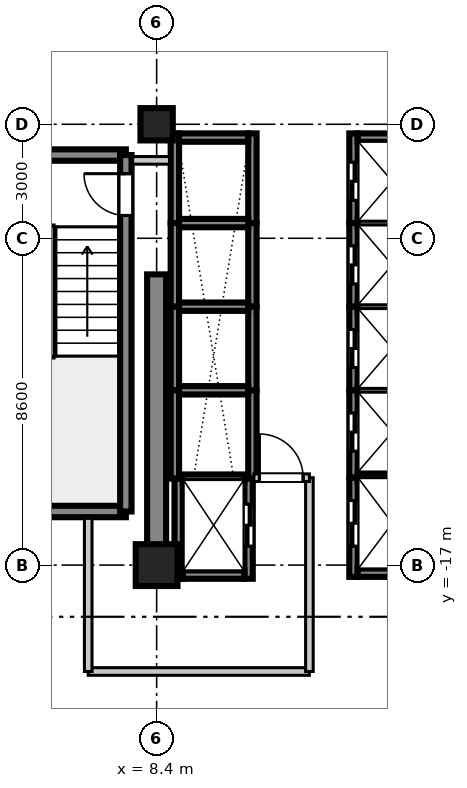
"""IFC4 building model, lengths in metres.
Left out: names, types, materials, properties, quantities, classifications, styles, units other than length and angle.
Written with IfcOpenShell. Run it as: python <this file> out.ifc"""

import sys

from ifc_helpers import new_model, si_unit, direction, frame, frame_2d, origin, origin_2d, place, context, subcontext, project, spatial, rectangle, extrude, source, transform, mapped, element, fill, save


model = new_model("IFC4")
c1 = context("Model", 3, precision=1e-05, world=origin(), true_north=direction((0.0, 1.0)))
c2 = subcontext(c1, "Body", "Model", "MODEL_VIEW")
j1 = project(units=[si_unit("LENGTHUNIT", "METRE"), si_unit("PLANEANGLEUNIT", "RADIAN")], contexts=[c1])
p1 = place(None, origin())
s1 = spatial("IfcSite", under=j1, at=p1, CompositionType="ELEMENT")
p2 = place(p1, origin())
s2 = spatial("IfcBuilding", under=s1, at=p2, CompositionType="ELEMENT")
p3 = place(p2, frame((0.0, 0.0, 170.9)))
s3 = spatial("IfcBuildingStorey", under=s2, at=p3, CompositionType="ELEMENT", Elevation=170.9)
m1 = source(origin(), c2, "Body", "SweptSolid", [
    extrude(rectangle(XDim=1.1, YDim=1.1, at=origin_2d()), origin(), (0.0, 0.0, 1.0), 3.605),
])
p4 = place(p3, frame((8.4, -17.0, 0.0), z_axis=(0.0, 0.0, 1.0), x_axis=(1.0, 0.0, 0.0)))
e1 = element("IfcColumn", 1, at=p4, inside=s3, PredefinedType="COLUMN", context=c2, shape_type="MappedRepresentation", body=[
    mapped(m1, transform((0.0, 0.0, 0.0), scale=1.0)),
])
m2 = source(origin(), c2, "Body", "SweptSolid", [
    extrude(rectangle(XDim=0.85, YDim=0.85, at=origin_2d()), origin(), (0.0, 0.0, 1.0), 3.605),
])
p5 = place(p3, frame((8.4, -5.4, 0.0), z_axis=(0.0, 0.0, 1.0), x_axis=(1.0, 0.0, 0.0)))
e2 = element("IfcColumn", 2, at=p5, inside=s3, PredefinedType="PILASTER", context=c2, shape_type="MappedRepresentation", body=[
    mapped(m2, transform((0.0, 0.0, 0.0), scale=1.0)),
])
m3 = source(origin(), c2, "Body", "SweptSolid", [
    extrude(rectangle(XDim=7.65, YDim=0.5, at=frame_2d((3.825, 0.0))), origin(), (0.0, 0.0, 1.0), 3.39),
])
p6 = place(p3, frame((8.4, -17.0, 0.0), z_axis=(0.0, 0.0, 1.0), x_axis=(0.0, 1.0, 0.0)))
e3 = element("IfcWall", 3, at=p6, inside=s3, PredefinedType="SHEAR", context=c2, shape_type="MappedRepresentation", body=[
    mapped(m3, transform((0.0, 0.0, 0.0), scale=1.0)),
])
m4 = source(origin(), c2, "Body", "SweptSolid", [
    extrude(rectangle(XDim=3.98, YDim=0.3, at=frame_2d((1.99, 0.0))), origin(), (0.0, 0.0, 1.0), 3.39),
])
for number, where, z_axis, x_axis in (
    (4, (3.61, -15.59, 0.0), (0.0, 0.0, 1.0), (1.0, 0.0, 0.0)),
    (5, (3.61, -6.21, 0.0), (0.0, 0.0, 1.0), (1.0, 0.0, 0.0)),
):
    element("IfcWall", number, at=place(p3, frame(where, z_axis=z_axis, x_axis=x_axis)), inside=s3, PredefinedType="SHEAR", context=c2, shape_type="MappedRepresentation", body=[
        mapped(m4, transform((0.0, 0.0, 0.0), scale=1.0)),
    ])
m5 = source(origin(), c2, "Body", "SweptSolid", [
    extrude(rectangle(XDim=9.38, YDim=0.3, at=frame_2d((4.69, 0.0))), origin(), (0.0, 0.0, 1.0), 3.39),
])
p7 = place(p3, frame((7.59, -15.59, 0.0), z_axis=(0.0, 0.0, 1.0), x_axis=(0.0, 1.0, 0.0)))
e6 = element("IfcWall", 6, at=p7, inside=s3, PredefinedType="SHEAR", context=c2, shape_type="MappedRepresentation", body=[
    mapped(m5, transform((0.0, 0.0, 0.0), scale=1.0)),
])
p8 = place(p7, frame((7.79, 0.0, 0.0)))
e7 = element("IfcOpeningElement", 7, at=p8, cuts=e6, PredefinedType="OPENING", context=c2, shape_type="SweptSolid", body=[
    extrude(rectangle(XDim=1.1, YDim=2.15, at=frame_2d((0.55, 1.075))), frame((0.0, 0.16, 0.0), z_axis=(0.0, -1.0, 0.0), x_axis=(1.0, 0.0, 0.0)), (0.0, 0.0, 1.0), 0.32),
])
m6 = source(origin(), c2, "Body", "SweptSolid", [
    extrude(rectangle(XDim=2.36, YDim=0.22, at=frame_2d((1.18, 0.0))), origin(), (0.0, 0.0, 1.0), 3.39),
])
p9 = place(p3, frame((13.58, -8.0, 0.0), z_axis=(0.0, 0.0, 1.0), x_axis=(0.0, 1.0, 0.0)))
e8 = element("IfcWall", 8, at=p9, inside=s3, PredefinedType="SHEAR", context=c2, shape_type="MappedRepresentation", body=[
    mapped(m6, transform((0.0, 0.0, 0.0), scale=1.0)),
])
p10 = place(p9, frame((0.6, 0.0, 0.0)))
e9 = element("IfcOpeningElement", 9, at=p10, cuts=e8, PredefinedType="OPENING", context=c2, shape_type="SweptSolid", body=[
    extrude(rectangle(XDim=1.0, YDim=2.2, at=frame_2d((0.5, 1.1))), frame((0.0, 0.12, 0.0), z_axis=(0.0, -1.0, 0.0), x_axis=(1.0, 0.0, 0.0)), (0.0, 0.0, 1.0), 0.24),
])
m7 = source(origin(), c2, "Body", "SweptSolid", [
    extrude(rectangle(XDim=1.82, YDim=0.22, at=frame_2d((0.91, 0.0))), origin(), (0.0, 0.0, 1.0), 3.39),
])
p11 = place(p3, frame((13.69, -5.75, 0.0), z_axis=(0.0, 0.0, 1.0), x_axis=(1.0, 0.0, 0.0)))
e10 = element("IfcWall", 10, at=p11, inside=s3, PredefinedType="SHEAR", context=c2, shape_type="MappedRepresentation", body=[
    mapped(m7, transform((0.0, 0.0, 0.0), scale=1.0)),
])
m8 = source(origin(), c2, "Body", "SweptSolid", [
    extrude(rectangle(XDim=2.2, YDim=0.22, at=frame_2d((1.1, 0.0))), origin(), (0.0, 0.0, 1.0), 3.39),
])
p12 = place(p3, frame((13.58, -10.2, 0.0), z_axis=(0.0, 0.0, 1.0), x_axis=(0.0, 1.0, 0.0)))
e11 = element("IfcWall", 11, at=p12, inside=s3, PredefinedType="SHEAR", context=c2, shape_type="MappedRepresentation", body=[
    mapped(m8, transform((0.0, 0.0, 0.0), scale=1.0)),
])
p13 = place(p12, frame((0.6, 0.0, 0.0)))
e12 = element("IfcOpeningElement", 12, at=p13, cuts=e11, PredefinedType="OPENING", context=c2, shape_type="SweptSolid", body=[
    extrude(rectangle(XDim=1.0, YDim=2.2, at=frame_2d((0.5, 1.1))), frame((0.0, 0.12, 0.0), z_axis=(0.0, -1.0, 0.0), x_axis=(1.0, 0.0, 0.0)), (0.0, 0.0, 1.0), 0.24),
])
m9 = source(origin(), c2, "Body", "SweptSolid", [
    extrude(rectangle(XDim=1.82, YDim=0.22, at=frame_2d((0.91, 0.0))), origin(), (0.0, 0.0, 1.0), 3.65),
])
p14 = place(p3, frame((13.69, -8.0, 0.0), z_axis=(0.0, 0.0, 1.0), x_axis=(1.0, 0.0, 0.0)))
e13 = element("IfcWall", 13, at=p14, inside=s3, PredefinedType="SHEAR", context=c2, shape_type="MappedRepresentation", body=[
    mapped(m9, transform((0.0, 0.0, 0.0), scale=1.0)),
])
p15 = place(p3, frame((13.58, -12.4, 0.0), z_axis=(0.0, 0.0, 1.0), x_axis=(0.0, 1.0, 0.0)))
e14 = element("IfcWall", 14, at=p15, inside=s3, PredefinedType="SHEAR", context=c2, shape_type="MappedRepresentation", body=[
    mapped(m8, transform((0.0, 0.0, 0.0), scale=1.0)),
])
p16 = place(p15, frame((0.6, 0.0, 0.0)))
e15 = element("IfcOpeningElement", 15, at=p16, cuts=e14, PredefinedType="OPENING", context=c2, shape_type="SweptSolid", body=[
    extrude(rectangle(XDim=1.0, YDim=2.2, at=frame_2d((0.5, 1.1))), frame((0.0, 0.12, 0.0), z_axis=(0.0, -1.0, 0.0), x_axis=(1.0, 0.0, 0.0)), (0.0, 0.0, 1.0), 0.24),
])
p17 = place(p3, frame((13.69, -10.2, 0.0), z_axis=(0.0, 0.0, 1.0), x_axis=(1.0, 0.0, 0.0)))
e16 = element("IfcWall", 16, at=p17, inside=s3, PredefinedType="SHEAR", context=c2, shape_type="MappedRepresentation", body=[
    mapped(m9, transform((0.0, 0.0, 0.0), scale=1.0)),
])
m10 = source(origin(), c2, "Body", "SweptSolid", [
    extrude(rectangle(XDim=2.3, YDim=0.22, at=frame_2d((1.15, 0.0))), origin(), (0.0, 0.0, 1.0), 3.39),
])
p18 = place(p3, frame((13.58, -14.7, 0.0), z_axis=(0.0, 0.0, 1.0), x_axis=(0.0, 1.0, 0.0)))
e17 = element("IfcWall", 17, at=p18, inside=s3, PredefinedType="SHEAR", context=c2, shape_type="MappedRepresentation", body=[
    mapped(m10, transform((0.0, 0.0, 0.0), scale=1.0)),
])
p19 = place(p18, frame((0.7, 0.0, 0.0)))
e18 = element("IfcOpeningElement", 18, at=p19, cuts=e17, PredefinedType="OPENING", context=c2, shape_type="SweptSolid", body=[
    extrude(rectangle(XDim=1.0, YDim=2.2, at=frame_2d((0.5, 1.1))), frame((0.0, 0.12, 0.0), z_axis=(0.0, -1.0, 0.0), x_axis=(1.0, 0.0, 0.0)), (0.0, 0.0, 1.0), 0.24),
])
p20 = place(p3, frame((13.69, -12.4, 0.0), z_axis=(0.0, 0.0, 1.0), x_axis=(1.0, 0.0, 0.0)))
e19 = element("IfcWall", 19, at=p20, inside=s3, PredefinedType="SHEAR", context=c2, shape_type="MappedRepresentation", body=[
    mapped(m9, transform((0.0, 0.0, 0.0), scale=1.0)),
])
for number, where, z_axis, x_axis in (
    (20, (8.88, -8.0, 0.0), (0.0, 0.0, 1.0), (0.0, 1.0, 0.0)),
    (21, (10.92, -8.0, 0.0), (0.0, 0.0, 1.0), (0.0, 1.0, 0.0)),
):
    element("IfcWall", number, at=place(p3, frame(where, z_axis=z_axis, x_axis=x_axis)), inside=s3, PredefinedType="SHEAR", context=c2, shape_type="MappedRepresentation", body=[
        mapped(m6, transform((0.0, 0.0, 0.0), scale=1.0)),
    ])
p21 = place(p3, frame((8.99, -5.75, 0.0), z_axis=(0.0, 0.0, 1.0), x_axis=(1.0, 0.0, 0.0)))
e22 = element("IfcWall", 22, at=p21, inside=s3, PredefinedType="SHEAR", context=c2, shape_type="MappedRepresentation", body=[
    mapped(m7, transform((0.0, 0.0, 0.0), scale=1.0)),
])
for number, where, z_axis, x_axis in (
    (23, (8.88, -10.2, 0.0), (0.0, 0.0, 1.0), (0.0, 1.0, 0.0)),
    (24, (10.92, -10.2, 0.0), (0.0, 0.0, 1.0), (0.0, 1.0, 0.0)),
):
    element("IfcWall", number, at=place(p3, frame(where, z_axis=z_axis, x_axis=x_axis)), inside=s3, PredefinedType="SHEAR", context=c2, shape_type="MappedRepresentation", body=[
        mapped(m8, transform((0.0, 0.0, 0.0), scale=1.0)),
    ])
p22 = place(p3, frame((8.99, -8.0, 0.0), z_axis=(0.0, 0.0, 1.0), x_axis=(1.0, 0.0, 0.0)))
e25 = element("IfcWall", 25, at=p22, inside=s3, PredefinedType="SHEAR", context=c2, shape_type="MappedRepresentation", body=[
    mapped(m9, transform((0.0, 0.0, 0.0), scale=1.0)),
])
for number, where, z_axis, x_axis in (
    (26, (8.88, -12.4, 0.0), (0.0, 0.0, 1.0), (0.0, 1.0, 0.0)),
    (27, (10.92, -12.4, 0.0), (0.0, 0.0, 1.0), (0.0, 1.0, 0.0)),
):
    element("IfcWall", number, at=place(p3, frame(where, z_axis=z_axis, x_axis=x_axis)), inside=s3, PredefinedType="SHEAR", context=c2, shape_type="MappedRepresentation", body=[
        mapped(m8, transform((0.0, 0.0, 0.0), scale=1.0)),
    ])
p23 = place(p3, frame((8.99, -10.2, 0.0), z_axis=(0.0, 0.0, 1.0), x_axis=(1.0, 0.0, 0.0)))
e28 = element("IfcWall", 28, at=p23, inside=s3, PredefinedType="SHEAR", context=c2, shape_type="MappedRepresentation", body=[
    mapped(m9, transform((0.0, 0.0, 0.0), scale=1.0)),
])
m11 = source(origin(), c2, "Body", "SweptSolid", [
    extrude(rectangle(XDim=2.325, YDim=0.22, at=frame_2d((1.163, 0.0))), origin(), (0.0, 0.0, 1.0), 3.39),
])
for number, where, z_axis, x_axis in (
    (29, (8.88, -14.725, 0.0), (0.0, 0.0, 1.0), (0.0, 1.0, 0.0)),
    (30, (10.92, -14.725, 0.0), (0.0, 0.0, 1.0), (0.0, 1.0, 0.0)),
):
    element("IfcWall", number, at=place(p3, frame(where, z_axis=z_axis, x_axis=x_axis)), inside=s3, PredefinedType="SHEAR", context=c2, shape_type="MappedRepresentation", body=[
        mapped(m11, transform((0.0, 0.0, 0.0), scale=1.0)),
    ])
p24 = place(p3, frame((8.99, -12.4, 0.0), z_axis=(0.0, 0.0, 1.0), x_axis=(1.0, 0.0, 0.0)))
e31 = element("IfcWall", 31, at=p24, inside=s3, PredefinedType="SHEAR", context=c2, shape_type="MappedRepresentation", body=[
    mapped(m9, transform((0.0, 0.0, 0.0), scale=1.0)),
])
m12 = source(origin(), c2, "Body", "SweptSolid", [
    extrude(rectangle(XDim=2.635, YDim=0.22, at=frame_2d((1.317, 0.0))), origin(), (0.0, 0.0, 1.0), 3.39),
])
p25 = place(p3, frame((8.98, -17.36, 0.0), z_axis=(0.0, 0.0, 1.0), x_axis=(0.0, 1.0, 0.0)))
e32 = element("IfcWall", 32, at=p25, inside=s3, PredefinedType="SHEAR", context=c2, shape_type="MappedRepresentation", body=[
    mapped(m12, transform((0.0, 0.0, 0.0), scale=1.0)),
])
p26 = place(p3, frame((10.82, -17.36, 0.0), z_axis=(0.0, 0.0, 1.0), x_axis=(0.0, 1.0, 0.0)))
e33 = element("IfcWall", 33, at=p26, inside=s3, PredefinedType="SHEAR", context=c2, shape_type="MappedRepresentation", body=[
    mapped(m12, transform((0.0, 0.0, 0.0), scale=1.0)),
])
p27 = place(p26, frame((0.86, 0.0, 0.0)))
e34 = element("IfcOpeningElement", 34, at=p27, cuts=e33, PredefinedType="OPENING", context=c2, shape_type="SweptSolid", body=[
    extrude(rectangle(XDim=1.1, YDim=2.2, at=frame_2d((0.55, 1.1))), frame((0.0, 0.12, 0.0), z_axis=(0.0, -1.0, 0.0), x_axis=(1.0, 0.0, 0.0)), (0.0, 0.0, 1.0), 0.24),
])
m13 = source(origin(), c2, "Body", "SweptSolid", [
    extrude(rectangle(XDim=1.62, YDim=0.22, at=frame_2d((0.81, 0.0))), origin(), (0.0, 0.0, 1.0), 3.39),
])
p28 = place(p3, frame((9.09, -17.25, 0.0), z_axis=(0.0, 0.0, 1.0), x_axis=(1.0, 0.0, 0.0)))
e35 = element("IfcWall", 35, at=p28, inside=s3, PredefinedType="SHEAR", context=c2, shape_type="MappedRepresentation", body=[
    mapped(m13, transform((0.0, 0.0, 0.0), scale=1.0)),
])
m14 = source(origin(), c2, "Body", "SweptSolid", [
    extrude(rectangle(XDim=1.62, YDim=0.22, at=frame_2d((0.81, 0.0))), origin(), (0.0, 0.0, 1.0), 3.65),
])
p29 = place(p3, frame((9.09, -14.725, 0.0), z_axis=(0.0, 0.0, 1.0), x_axis=(1.0, 0.0, 0.0)))
e36 = element("IfcWall", 36, at=p29, inside=s3, PredefinedType="SHEAR", context=c2, shape_type="MappedRepresentation", body=[
    mapped(m14, transform((0.0, 0.0, 0.0), scale=1.0)),
])
m15 = source(origin(), c2, "Body", "SweptSolid", [
    extrude(rectangle(XDim=2.61, YDim=0.22, at=frame_2d((1.305, 0.0))), origin(), (0.0, 0.0, 1.0), 3.39),
])
p30 = place(p3, frame((13.58, -17.31, 0.0), z_axis=(0.0, 0.0, 1.0), x_axis=(0.0, 1.0, 0.0)))
e37 = element("IfcWall", 37, at=p30, inside=s3, PredefinedType="SHEAR", context=c2, shape_type="MappedRepresentation", body=[
    mapped(m15, transform((0.0, 0.0, 0.0), scale=1.0)),
])
p31 = place(p30, frame((0.81, 0.0, 0.0)))
e38 = element("IfcOpeningElement", 38, at=p31, cuts=e37, PredefinedType="OPENING", context=c2, shape_type="SweptSolid", body=[
    extrude(rectangle(XDim=1.2, YDim=2.2, at=frame_2d((0.6, 1.1))), frame((0.0, 0.12, 0.0), z_axis=(0.0, -1.0, 0.0), x_axis=(1.0, 0.0, 0.0)), (0.0, 0.0, 1.0), 0.24),
])
p32 = place(p3, frame((13.69, -17.2, 0.0), z_axis=(0.0, 0.0, 1.0), x_axis=(1.0, 0.0, 0.0)))
e39 = element("IfcWall", 39, at=p32, inside=s3, PredefinedType="SHEAR", context=c2, shape_type="MappedRepresentation", body=[
    mapped(m7, transform((0.0, 0.0, 0.0), scale=1.0)),
])
p33 = place(p3, frame((13.69, -14.7, 0.0), z_axis=(0.0, 0.0, 1.0), x_axis=(1.0, 0.0, 0.0)))
e40 = element("IfcWall", 40, at=p33, inside=s3, PredefinedType="SHEAR", context=c2, shape_type="MappedRepresentation", body=[
    mapped(m9, transform((0.0, 0.0, 0.0), scale=1.0)),
])
m16 = source(origin(), c2, "Body", "SweptSolid", [
    extrude(rectangle(XDim=5.82, YDim=0.2, at=frame_2d((2.91, 0.0))), origin(), (0.0, 0.0, 1.0), 2.73),
])
p34 = place(p3, frame((6.6, -19.8, 0.0), z_axis=(0.0, 0.0, 1.0), x_axis=(1.0, 0.0, 0.0)))
e41 = element("IfcWall", 41, at=p34, inside=s3, PredefinedType="PARTITIONING", context=c2, shape_type="MappedRepresentation", body=[
    mapped(m16, transform((0.0, 0.0, 0.0), scale=1.0)),
])
m17 = source(origin(), c2, "Body", "SweptSolid", [
    extrude(rectangle(XDim=4.03, YDim=0.2, at=frame_2d((2.015, 0.0))), origin(), (0.0, 0.0, 1.0), 2.73),
])
p35 = place(p3, frame((6.6, -19.8, 0.0), z_axis=(0.0, 0.0, 1.0), x_axis=(0.0, 1.0, 0.0)))
e42 = element("IfcWall", 42, at=p35, inside=s3, PredefinedType="PARTITIONING", context=c2, shape_type="MappedRepresentation", body=[
    mapped(m17, transform((0.0, 0.0, 0.0), scale=1.0)),
])
m18 = source(origin(), c2, "Body", "SweptSolid", [
    extrude(rectangle(XDim=5.1, YDim=0.2, at=frame_2d((2.55, 0.0))), origin(), (0.0, 0.0, 1.0), 2.73),
])
p36 = place(p3, frame((12.42, -19.8, 0.0), z_axis=(0.0, 0.0, 1.0), x_axis=(0.0, 1.0, 0.0)))
e43 = element("IfcWall", 43, at=p36, inside=s3, PredefinedType="PARTITIONING", context=c2, shape_type="MappedRepresentation", body=[
    mapped(m18, transform((0.0, 0.0, 0.0), scale=1.0)),
])
m19 = source(origin(), c2, "Body", "SweptSolid", [
    extrude(rectangle(XDim=1.46, YDim=0.2, at=frame_2d((0.73, 0.0))), origin(), (0.0, 0.0, 1.0), 2.73),
])
p37 = place(p3, frame((10.96, -14.7, 0.0), z_axis=(0.0, 0.0, 1.0), x_axis=(1.0, 0.0, 0.0)))
e44 = element("IfcWall", 44, at=p37, inside=s3, PredefinedType="PARTITIONING", context=c2, shape_type="MappedRepresentation", body=[
    mapped(m19, transform((0.0, 0.0, 0.0), scale=1.0)),
])
p38 = place(p37, frame((0.145, 0.0, 0.0)))
e45 = element("IfcOpeningElement", 45, at=p38, cuts=e44, PredefinedType="OPENING", context=c2, shape_type="SweptSolid", body=[
    extrude(rectangle(XDim=1.15, YDim=2.15, at=frame_2d((0.575, 1.075))), frame((0.0, 0.11, 0.0), z_axis=(0.0, -1.0, 0.0), x_axis=(1.0, 0.0, 0.0)), (0.0, 0.0, 1.0), 0.22),
])
m20 = source(origin(), c2, "Body", "SweptSolid", [
    extrude(rectangle(XDim=0.97, YDim=0.2, at=frame_2d((0.485, 0.0))), origin(), (0.0, 0.0, 1.0), 2.73),
])
p39 = place(p3, frame((7.77, -6.35, 0.0), z_axis=(0.0, 0.0, 1.0), x_axis=(1.0, 0.0, 0.0)))
e46 = element("IfcWall", 46, at=p39, inside=s3, PredefinedType="PARTITIONING", context=c2, shape_type="MappedRepresentation", body=[
    mapped(m20, transform((0.0, 0.0, 0.0), scale=1.0)),
])
m21 = source(origin(), c2, "Body", "SweptSolid", [
    extrude(rectangle(XDim=1.1, YDim=2.15, at=frame_2d((0.55, 1.075))), frame((0.0, 0.025, 0.0), z_axis=(0.0, -1.0, 0.0), x_axis=(1.0, 0.0, 0.0)), (0.0, 0.0, 1.0), 0.05),
])
p40 = place(p8, origin())
e47 = element("IfcDoor", 47, at=p40, inside=s3, OperationType="SINGLE_SWING_RIGHT", PredefinedType="DOOR", context=c2, shape_type="MappedRepresentation", body=[
    mapped(m21, transform((0.0, 0.0, 0.0), scale=1.0)),
])
fill(e7, e47)
m22 = source(origin(), c2, "Body", "SweptSolid", [
    extrude(rectangle(XDim=1.0, YDim=2.2, at=frame_2d((0.5, 1.1))), frame((0.0, 0.025, 0.0), z_axis=(0.0, -1.0, 0.0), x_axis=(1.0, 0.0, 0.0)), (0.0, 0.0, 1.0), 0.05),
])
p41 = place(p10, origin())
e48 = element("IfcDoor", 48, at=p41, inside=s3, OperationType="DOUBLE_DOOR_SLIDING", PredefinedType="DOOR", context=c2, shape_type="MappedRepresentation", body=[
    mapped(m22, transform((0.0, 0.0, 0.0), scale=1.0)),
])
fill(e9, e48)
p42 = place(p13, origin())
e49 = element("IfcDoor", 49, at=p42, inside=s3, OperationType="DOUBLE_DOOR_SLIDING", PredefinedType="DOOR", context=c2, shape_type="MappedRepresentation", body=[
    mapped(m22, transform((0.0, 0.0, 0.0), scale=1.0)),
])
fill(e12, e49)
p43 = place(p16, origin())
e50 = element("IfcDoor", 50, at=p43, inside=s3, OperationType="DOUBLE_DOOR_SLIDING", PredefinedType="DOOR", context=c2, shape_type="MappedRepresentation", body=[
    mapped(m22, transform((0.0, 0.0, 0.0), scale=1.0)),
])
fill(e15, e50)
p44 = place(p19, origin())
e51 = element("IfcDoor", 51, at=p44, inside=s3, OperationType="DOUBLE_DOOR_SLIDING", PredefinedType="DOOR", context=c2, shape_type="MappedRepresentation", body=[
    mapped(m22, transform((0.0, 0.0, 0.0), scale=1.0)),
])
fill(e18, e51)
m23 = source(origin(), c2, "Body", "SweptSolid", [
    extrude(rectangle(XDim=1.1, YDim=2.2, at=frame_2d((0.55, 1.1))), frame((0.0, 0.025, 0.0), z_axis=(0.0, -1.0, 0.0), x_axis=(1.0, 0.0, 0.0)), (0.0, 0.0, 1.0), 0.05),
])
p45 = place(p27, frame((1.1, 0.0, 0.0), z_axis=(0.0, 0.0, 1.0), x_axis=(-1.0, 0.0, 0.0)))
e52 = element("IfcDoor", 52, at=p45, inside=s3, OperationType="DOUBLE_DOOR_SLIDING", PredefinedType="DOOR", context=c2, shape_type="MappedRepresentation", body=[
    mapped(m23, transform((0.0, 0.0, 0.0), scale=1.0)),
])
fill(e34, e52)
m24 = source(origin(), c2, "Body", "SweptSolid", [
    extrude(rectangle(XDim=1.2, YDim=2.2, at=frame_2d((0.6, 1.1))), frame((0.0, 0.025, 0.0), z_axis=(0.0, -1.0, 0.0), x_axis=(1.0, 0.0, 0.0)), (0.0, 0.0, 1.0), 0.05),
])
p46 = place(p31, origin())
e53 = element("IfcDoor", 53, at=p46, inside=s3, OperationType="DOUBLE_DOOR_SLIDING", PredefinedType="DOOR", context=c2, shape_type="MappedRepresentation", body=[
    mapped(m24, transform((0.0, 0.0, 0.0), scale=1.0)),
])
fill(e38, e53)
m25 = source(origin(), c2, "Body", "SweptSolid", [
    extrude(rectangle(XDim=1.15, YDim=2.15, at=frame_2d((0.575, 1.075))), frame((0.0, 0.025, 0.0), z_axis=(0.0, -1.0, 0.0), x_axis=(1.0, 0.0, 0.0)), (0.0, 0.0, 1.0), 0.05),
])
p47 = place(p38, origin())
e54 = element("IfcDoor", 54, at=p47, inside=s3, OperationType="SINGLE_SWING_LEFT", PredefinedType="DOOR", context=c2, shape_type="MappedRepresentation", body=[
    mapped(m25, transform((0.0, 0.0, 0.0), scale=1.0)),
])
fill(e45, e54)
save(model, sys.argv[1])
